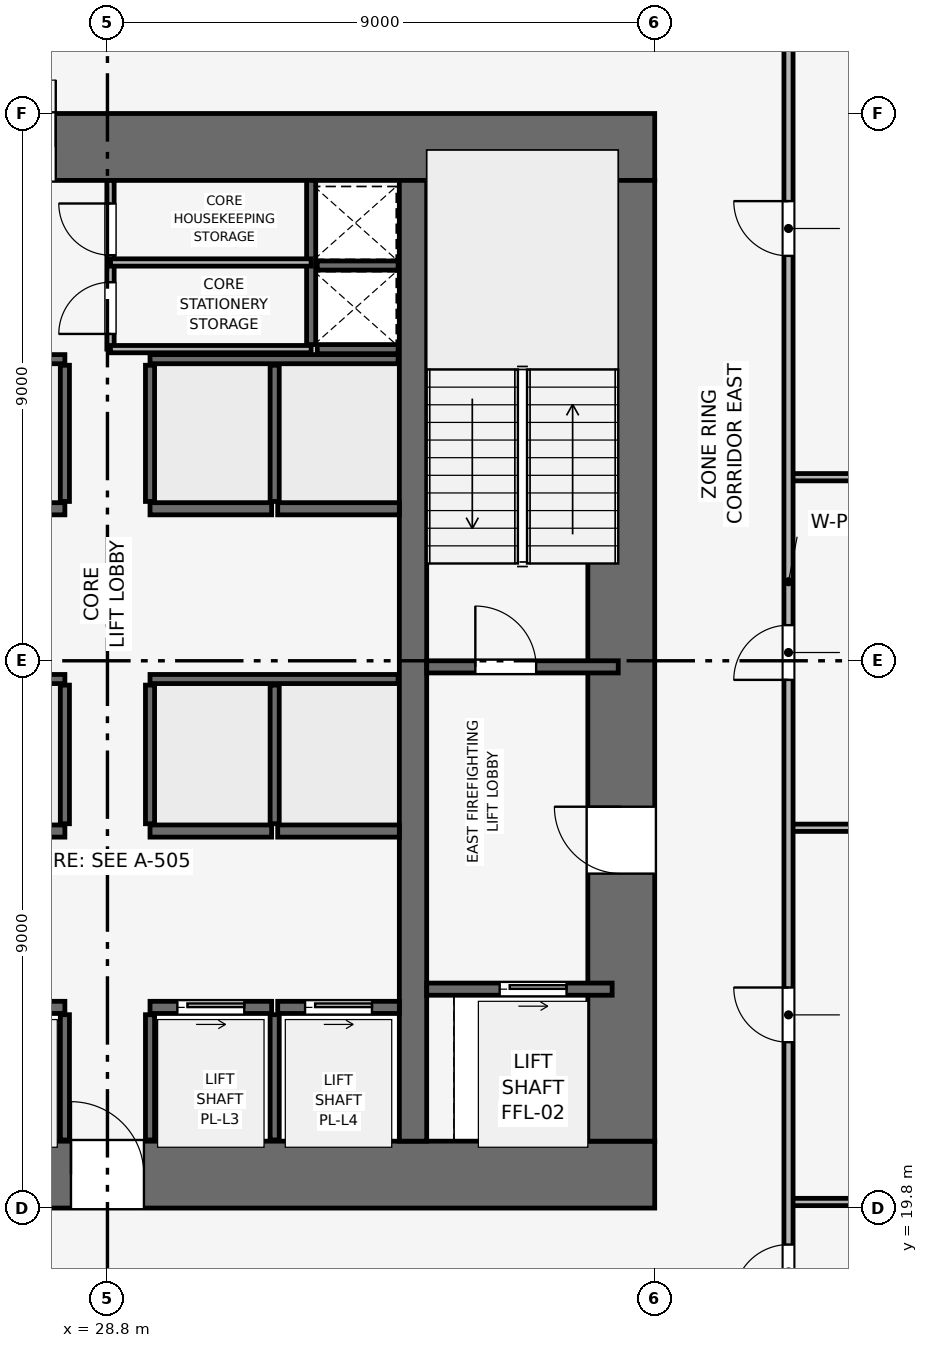
"""IFC4 building model, lengths in metres.
Left out: names, types, materials, properties, quantities, classifications, styles, units other than length and angle.
Written with IfcOpenShell. Run it as: python <this file> out.ifc"""

import sys

from ifc_helpers import new_model, si_unit, direction, frame, frame_2d, origin, place, context, subcontext, project, spatial, rectangle, extrude, element, fill, save


model = new_model("IFC4")
c1 = context("Model", 3, precision=1e-05, world=origin(), true_north=direction((0.0, 1.0)))
c2 = subcontext(c1, "Body", "Model", "MODEL_VIEW")
j1 = project(units=[si_unit("LENGTHUNIT", "METRE"), si_unit("PLANEANGLEUNIT", "RADIAN")], contexts=[c1])
p1 = place(None, origin())
s1 = spatial("IfcSite", under=j1, at=p1, CompositionType="ELEMENT")
p2 = place(p1, origin())
s2 = spatial("IfcBuilding", under=s1, at=p2, CompositionType="ELEMENT")
p3 = place(p2, frame((0.0, 0.0, 104.1)))
s3 = spatial("IfcBuildingStorey", under=s2, at=p3, CompositionType="ELEMENT", Elevation=104.1)
p4 = place(p3, frame((19.8, 20.35, 0.0), z_axis=(0.0, 0.0, 1.0), x_axis=(1.0, 0.0, 0.0)))
e1 = element("IfcWall", 1, at=p4, inside=s3, PredefinedType="SHEAR", context=c2, shape_type="SweptSolid", body=[
    extrude(rectangle(XDim=18.0, YDim=1.1, at=frame_2d((9.0, 0.0))), origin(), (0.0, 0.0, 1.0), 3.9),
])
p5 = place(p4, frame((8.4, 0.0, 0.0)))
e2 = element("IfcOpeningElement", 2, at=p5, cuts=e1, PredefinedType="OPENING", context=c2, shape_type="SweptSolid", body=[
    extrude(rectangle(XDim=1.2, YDim=2.2, at=frame_2d((0.6, 1.1))), frame((0.0, 0.56, 0.0), z_axis=(0.0, -1.0, 0.0), x_axis=(1.0, 0.0, 0.0)), (0.0, 0.0, 1.0), 1.12),
])
p6 = place(p3, frame((19.8, 37.25, 0.0), z_axis=(0.0, 0.0, 1.0), x_axis=(1.0, 0.0, 0.0)))
e3 = element("IfcWall", 3, at=p6, inside=s3, PredefinedType="SHEAR", context=c2, shape_type="SweptSolid", body=[
    extrude(rectangle(XDim=18.0, YDim=1.1, at=frame_2d((9.0, 0.0))), origin(), (0.0, 0.0, 1.0), 3.9),
])
p7 = place(p6, frame((7.05, 0.0, 0.0)))
e4 = element("IfcOpeningElement", 4, at=p7, cuts=e3, PredefinedType="OPENING", context=c2, shape_type="SweptSolid", body=[
    extrude(rectangle(XDim=1.1, YDim=2.15, at=frame_2d((0.55, 1.075))), frame((0.0, 0.56, 0.0), z_axis=(0.0, -1.0, 0.0), x_axis=(1.0, 0.0, 0.0)), (0.0, 0.0, 1.0), 1.12),
])
p8 = place(p3, frame((37.25, 20.9, 0.0), z_axis=(0.0, 0.0, 1.0), x_axis=(0.0, 1.0, 0.0)))
e5 = element("IfcWall", 5, at=p8, inside=s3, PredefinedType="SHEAR", context=c2, shape_type="SweptSolid", body=[
    extrude(rectangle(XDim=15.8, YDim=1.1, at=frame_2d((7.9, 0.0))), origin(), (0.0, 0.0, 1.0), 3.9),
])
p9 = place(p8, frame((4.4, 0.0, 0.0)))
e6 = element("IfcOpeningElement", 6, at=p9, cuts=e5, PredefinedType="OPENING", context=c2, shape_type="SweptSolid", body=[
    extrude(rectangle(XDim=1.1, YDim=2.15, at=frame_2d((0.55, 1.075))), frame((0.0, 0.56, 0.0), z_axis=(0.0, -1.0, 0.0), x_axis=(1.0, 0.0, 0.0)), (0.0, 0.0, 1.0), 1.12),
])
p10 = place(p3, frame((33.825, 20.9, 0.0), z_axis=(0.0, 0.0, 1.0), x_axis=(0.0, 1.0, 0.0)))
e7 = element("IfcWall", 7, at=p10, inside=s3, PredefinedType="SHEAR", context=c2, shape_type="SweptSolid", body=[
    extrude(rectangle(XDim=15.8, YDim=0.45, at=frame_2d((7.9, 0.0))), origin(), (0.0, 0.0, 1.0), 3.9),
])
p11 = place(p3, frame((34.05, 28.7, 0.0), z_axis=(0.0, 0.0, 1.0), x_axis=(1.0, 0.0, 0.0)))
e8 = element("IfcWall", 8, at=p11, inside=s3, PredefinedType="SHEAR", context=c2, shape_type="SweptSolid", body=[
    extrude(rectangle(XDim=3.15, YDim=0.2, at=frame_2d((1.575, 0.0))), origin(), (0.0, 0.0, 1.0), 3.54),
])
p12 = place(p11, frame((0.8, 0.0, 0.0)))
e9 = element("IfcOpeningElement", 9, at=p12, cuts=e8, PredefinedType="OPENING", context=c2, shape_type="SweptSolid", body=[
    extrude(rectangle(XDim=1.0, YDim=2.1, at=frame_2d((0.5, 1.05))), frame((0.0, 0.11, 0.0), z_axis=(0.0, -1.0, 0.0), x_axis=(1.0, 0.0, 0.0)), (0.0, 0.0, 1.0), 0.22),
])
p13 = place(p3, frame((32.15, 34.0, 0.0), z_axis=(0.0, 0.0, 1.0), x_axis=(0.0, 1.0, 0.0)))
e10 = element("IfcWall", 10, at=p13, inside=s3, PredefinedType="SHEAR", context=c2, shape_type="SweptSolid", body=[
    extrude(rectangle(XDim=2.7, YDim=0.15, at=frame_2d((1.35, 0.0))), origin(), (0.0, 0.0, 1.0), 3.54),
])
for number, where, z_axis, x_axis in (
    (11, (32.25, 33.925, 0.0), (0.0, 0.0, 1.0), (1.0, 0.0, 0.0)),
    (12, (32.25, 35.3, 0.0), (0.0, 0.0, 1.0), (1.0, 0.0, 0.0)),
):
    element("IfcWall", number, at=place(p3, frame(where, z_axis=z_axis, x_axis=x_axis)), inside=s3, PredefinedType="SHEAR", context=c2, shape_type="SweptSolid", body=[
        extrude(rectangle(XDim=1.33, YDim=0.15, at=frame_2d((0.665, 0.0))), origin(), (0.0, 0.0, 1.0), 3.54),
    ])
p14 = place(p3, frame((34.05, 23.4, 0.0), z_axis=(0.0, 0.0, 1.0), x_axis=(1.0, 0.0, 0.0)))
e13 = element("IfcWall", 13, at=p14, inside=s3, PredefinedType="SHEAR", context=c2, shape_type="SweptSolid", body=[
    extrude(rectangle(XDim=3.05, YDim=0.2, at=frame_2d((1.525, 0.0))), origin(), (0.0, 0.0, 1.0), 3.54),
])
p15 = place(p14, frame((1.2, 0.0, 0.0)))
e14 = element("IfcOpeningElement", 14, at=p15, cuts=e13, PredefinedType="OPENING", context=c2, shape_type="SweptSolid", body=[
    extrude(rectangle(XDim=1.1, YDim=2.15, at=frame_2d((0.55, 1.075))), frame((0.0, 0.11, 0.0), z_axis=(0.0, -1.0, 0.0), x_axis=(1.0, 0.0, 0.0)), (0.0, 0.0, 1.0), 0.22),
])
p16 = place(p3, frame((26.1, 23.1, 0.0), z_axis=(0.0, 0.0, 1.0), x_axis=(1.0, 0.0, 0.0)))
e15 = element("IfcWall", 15, at=p16, inside=s3, PredefinedType="SHEAR", context=c2, shape_type="SweptSolid", body=[
    extrude(rectangle(XDim=2.0, YDim=0.2, at=frame_2d((1.0, 0.0))), origin(), (0.0, 0.0, 1.0), 3.54),
])
p17 = place(p16, frame((0.45, 0.0, 0.0)))
e16 = element("IfcOpeningElement", 16, at=p17, cuts=e15, PredefinedType="OPENING", context=c2, shape_type="SweptSolid", body=[
    extrude(rectangle(XDim=1.1, YDim=2.15, at=frame_2d((0.55, 1.075))), frame((0.0, 0.11, 0.0), z_axis=(0.0, -1.0, 0.0), x_axis=(1.0, 0.0, 0.0)), (0.0, 0.0, 1.0), 0.22),
])
p18 = place(p3, frame((29.5, 23.1, 0.0), z_axis=(0.0, 0.0, 1.0), x_axis=(1.0, 0.0, 0.0)))
e17 = element("IfcWall", 17, at=p18, inside=s3, PredefinedType="SHEAR", context=c2, shape_type="SweptSolid", body=[
    extrude(rectangle(XDim=2.0, YDim=0.2, at=frame_2d((1.0, 0.0))), origin(), (0.0, 0.0, 1.0), 3.54),
])
p19 = place(p18, frame((0.45, 0.0, 0.0)))
e18 = element("IfcOpeningElement", 18, at=p19, cuts=e17, PredefinedType="OPENING", context=c2, shape_type="SweptSolid", body=[
    extrude(rectangle(XDim=1.1, YDim=2.15, at=frame_2d((0.55, 1.075))), frame((0.0, 0.11, 0.0), z_axis=(0.0, -1.0, 0.0), x_axis=(1.0, 0.0, 0.0)), (0.0, 0.0, 1.0), 0.22),
])
p20 = place(p3, frame((31.6, 23.1, 0.0), z_axis=(0.0, 0.0, 1.0), x_axis=(1.0, 0.0, 0.0)))
e19 = element("IfcWall", 19, at=p20, inside=s3, PredefinedType="SHEAR", context=c2, shape_type="SweptSolid", body=[
    extrude(rectangle(XDim=2.0, YDim=0.2, at=frame_2d((1.0, 0.0))), origin(), (0.0, 0.0, 1.0), 3.54),
])
p21 = place(p20, frame((0.45, 0.0, 0.0)))
e20 = element("IfcOpeningElement", 20, at=p21, cuts=e19, PredefinedType="OPENING", context=c2, shape_type="SweptSolid", body=[
    extrude(rectangle(XDim=1.1, YDim=2.15, at=frame_2d((0.55, 1.075))), frame((0.0, 0.11, 0.0), z_axis=(0.0, -1.0, 0.0), x_axis=(1.0, 0.0, 0.0)), (0.0, 0.0, 1.0), 0.22),
])
for number, where, z_axis, x_axis in (
    (21, (26.1, 26.0, 0.0), (0.0, 0.0, 1.0), (1.0, 0.0, 0.0)),
    (22, (29.5, 26.0, 0.0), (0.0, 0.0, 1.0), (1.0, 0.0, 0.0)),
    (23, (31.6, 26.0, 0.0), (0.0, 0.0, 1.0), (1.0, 0.0, 0.0)),
    (24, (26.1, 31.3, 0.0), (0.0, 0.0, 1.0), (1.0, 0.0, 0.0)),
    (25, (29.5, 31.3, 0.0), (0.0, 0.0, 1.0), (1.0, 0.0, 0.0)),
    (26, (31.6, 31.3, 0.0), (0.0, 0.0, 1.0), (1.0, 0.0, 0.0)),
):
    element("IfcWall", number, at=place(p3, frame(where, z_axis=z_axis, x_axis=x_axis)), inside=s3, PredefinedType="SHEAR", context=c2, shape_type="SweptSolid", body=[
        extrude(rectangle(XDim=2.0, YDim=0.2, at=frame_2d((1.0, 0.0))), origin(), (0.0, 0.0, 1.0), 3.54),
    ])
for number, where, z_axis, x_axis in (
    (27, (28.1, 20.92, 0.0), (0.0, 0.0, 1.0), (0.0, 1.0, 0.0)),
    (28, (29.5, 20.92, 0.0), (0.0, 0.0, 1.0), (0.0, 1.0, 0.0)),
    (29, (31.55, 20.92, 0.0), (0.0, 0.0, 1.0), (0.0, 1.0, 0.0)),
):
    element("IfcWall", number, at=place(p3, frame(where, z_axis=z_axis, x_axis=x_axis)), inside=s3, PredefinedType="SHEAR", context=c2, shape_type="SweptSolid", body=[
        extrude(rectangle(XDim=2.06, YDim=0.15, at=frame_2d((1.03, 0.0))), origin(), (0.0, 0.0, 1.0), 3.54),
    ])
for number, where, z_axis, x_axis in (
    (30, (24.02, 28.5, 0.0), (0.0, 0.0, 1.0), (1.0, 0.0, 0.0)),
    (31, (29.5, 28.5, 0.0), (0.0, 0.0, 1.0), (1.0, 0.0, 0.0)),
):
    element("IfcWall", number, at=place(p3, frame(where, z_axis=z_axis, x_axis=x_axis)), inside=s3, PredefinedType="SHEAR", context=c2, shape_type="SweptSolid", body=[
        extrude(rectangle(XDim=4.08, YDim=0.15, at=frame_2d((2.04, 0.0))), origin(), (0.0, 0.0, 1.0), 3.54),
    ])
for number, where, z_axis, x_axis in (
    (32, (28.1, 26.12, 0.0), (0.0, 0.0, 1.0), (0.0, 1.0, 0.0)),
    (33, (29.5, 26.12, 0.0), (0.0, 0.0, 1.0), (0.0, 1.0, 0.0)),
    (34, (31.55, 26.12, 0.0), (0.0, 0.0, 1.0), (0.0, 1.0, 0.0)),
):
    element("IfcWall", number, at=place(p3, frame(where, z_axis=z_axis, x_axis=x_axis)), inside=s3, PredefinedType="SHEAR", context=c2, shape_type="SweptSolid", body=[
        extrude(rectangle(XDim=2.28, YDim=0.15, at=frame_2d((1.14, 0.0))), origin(), (0.0, 0.0, 1.0), 3.54),
    ])
for number, where, z_axis, x_axis in (
    (35, (24.02, 33.76, 0.0), (0.0, 0.0, 1.0), (1.0, 0.0, 0.0)),
    (36, (29.5, 33.76, 0.0), (0.0, 0.0, 1.0), (1.0, 0.0, 0.0)),
):
    element("IfcWall", number, at=place(p3, frame(where, z_axis=z_axis, x_axis=x_axis)), inside=s3, PredefinedType="SHEAR", context=c2, shape_type="SweptSolid", body=[
        extrude(rectangle(XDim=4.08, YDim=0.15, at=frame_2d((2.04, 0.0))), origin(), (0.0, 0.0, 1.0), 3.54),
    ])
for number, where, z_axis, x_axis in (
    (37, (28.1, 31.42, 0.0), (0.0, 0.0, 1.0), (0.0, 1.0, 0.0)),
    (38, (29.5, 31.42, 0.0), (0.0, 0.0, 1.0), (0.0, 1.0, 0.0)),
    (39, (31.55, 31.42, 0.0), (0.0, 0.0, 1.0), (0.0, 1.0, 0.0)),
):
    element("IfcWall", number, at=place(p3, frame(where, z_axis=z_axis, x_axis=x_axis)), inside=s3, PredefinedType="SHEAR", context=c2, shape_type="SweptSolid", body=[
        extrude(rectangle(XDim=2.24, YDim=0.15, at=frame_2d((1.12, 0.0))), origin(), (0.0, 0.0, 1.0), 3.54),
    ])
p22 = place(p3, frame((28.85, 33.925, 0.0), z_axis=(0.0, 0.0, 1.0), x_axis=(0.0, 1.0, 0.0)))
e40 = element("IfcWall", 40, at=p22, inside=s3, PredefinedType="PARTITIONING", context=c2, shape_type="SweptSolid", body=[
    extrude(rectangle(XDim=2.775, YDim=0.12, at=frame_2d((1.387, 0.0))), origin(), (0.0, 0.0, 1.0), 3.54),
])
p23 = place(p22, frame((0.25, 0.0, 0.0)))
e41 = element("IfcOpeningElement", 41, at=p23, cuts=e40, PredefinedType="OPENING", context=c2, shape_type="SweptSolid", body=[
    extrude(rectangle(XDim=0.85, YDim=2.1, at=frame_2d((0.425, 1.05))), frame((0.0, 0.07, 0.0), z_axis=(0.0, -1.0, 0.0), x_axis=(1.0, 0.0, 0.0)), (0.0, 0.0, 1.0), 0.14),
])
p24 = place(p22, frame((1.545, 0.0, 0.0)))
e42 = element("IfcOpeningElement", 42, at=p24, cuts=e40, PredefinedType="OPENING", context=c2, shape_type="SweptSolid", body=[
    extrude(rectangle(XDim=0.85, YDim=2.1, at=frame_2d((0.425, 1.05))), frame((0.0, 0.07, 0.0), z_axis=(0.0, -1.0, 0.0), x_axis=(1.0, 0.0, 0.0)), (0.0, 0.0, 1.0), 0.14),
])
for number, where, z_axis, x_axis in (
    (43, (28.85, 35.35, 0.0), (0.0, 0.0, 1.0), (1.0, 0.0, 0.0)),
    (44, (28.85, 33.925, 0.0), (0.0, 0.0, 1.0), (1.0, 0.0, 0.0)),
):
    element("IfcWall", number, at=place(p3, frame(where, z_axis=z_axis, x_axis=x_axis)), inside=s3, PredefinedType="PARTITIONING", context=c2, shape_type="SweptSolid", body=[
        extrude(rectangle(XDim=3.3, YDim=0.12, at=frame_2d((1.65, 0.0))), origin(), (0.0, 0.0, 1.0), 3.54),
    ])
for number, where, z_axis, x_axis in (
    (45, (40.0, 19.9, 0.0), (0.0, 0.0, 1.0), (1.0, 0.0, 0.0)),
    (46, (40.0, 26.054, 0.0), (0.0, 0.0, 1.0), (1.0, 0.0, 0.0)),
    (47, (40.0, 31.819, 0.0), (0.0, 0.0, 1.0), (1.0, 0.0, 0.0)),
):
    element("IfcWall", number, at=place(p3, frame(where, z_axis=z_axis, x_axis=x_axis)), inside=s3, PredefinedType="PARTITIONING", context=c2, shape_type="SweptSolid", body=[
        extrude(rectangle(XDim=16.57, YDim=0.12, at=frame_2d((8.285, 0.0))), origin(), (0.0, 0.0, 1.0), 2.825),
    ])
p25 = place(p3, frame((40.0, 17.6, 0.0), z_axis=(0.0, 0.0, 1.0), x_axis=(0.0, 1.0, 0.0)))
e48 = element("IfcWall", 48, at=p25, inside=s3, PredefinedType="PARTITIONING", context=c2, shape_type="SweptSolid", body=[
    extrude(rectangle(XDim=22.4, YDim=0.15, at=frame_2d((11.2, 0.0))), origin(), (0.0, 0.0, 1.0), 2.975),
])
p26 = place(p25, frame((0.7, 0.0, 0.0)))
e49 = element("IfcOpeningElement", 49, at=p26, cuts=e48, PredefinedType="OPENING", context=c2, shape_type="SweptSolid", body=[
    extrude(rectangle(XDim=0.9, YDim=2.1, at=frame_2d((0.45, 1.05))), frame((0.0, 0.085, 0.0), z_axis=(0.0, -1.0, 0.0), x_axis=(1.0, 0.0, 0.0)), (0.0, 0.0, 1.0), 0.17),
])
p27 = place(p25, frame((4.927, 0.0, 0.0)))
e50 = element("IfcOpeningElement", 50, at=p27, cuts=e48, PredefinedType="OPENING", context=c2, shape_type="SweptSolid", body=[
    extrude(rectangle(XDim=0.9, YDim=2.1, at=frame_2d((0.45, 1.05))), frame((0.0, 0.085, 0.0), z_axis=(0.0, -1.0, 0.0), x_axis=(1.0, 0.0, 0.0)), (0.0, 0.0, 1.0), 0.17),
])
p28 = place(p25, frame((10.886, 0.0, 0.0)))
e51 = element("IfcOpeningElement", 51, at=p28, cuts=e48, PredefinedType="OPENING", context=c2, shape_type="SweptSolid", body=[
    extrude(rectangle(XDim=0.9, YDim=2.1, at=frame_2d((0.45, 1.05))), frame((0.0, 0.085, 0.0), z_axis=(0.0, -1.0, 0.0), x_axis=(1.0, 0.0, 0.0)), (0.0, 0.0, 1.0), 0.17),
])
p29 = place(p25, frame((17.859, 0.0, 0.0)))
e52 = element("IfcOpeningElement", 52, at=p29, cuts=e48, PredefinedType="OPENING", context=c2, shape_type="SweptSolid", body=[
    extrude(rectangle(XDim=0.9, YDim=2.1, at=frame_2d((0.45, 1.05))), frame((0.0, 0.085, 0.0), z_axis=(0.0, -1.0, 0.0), x_axis=(1.0, 0.0, 0.0)), (0.0, 0.0, 1.0), 0.17),
])
p30 = place(p12, origin())
e53 = element("IfcDoor", 53, at=p30, inside=s3, OperationType="SINGLE_SWING_LEFT", PredefinedType="DOOR", context=c2, shape_type="SweptSolid", body=[
    extrude(rectangle(XDim=1.0, YDim=2.1, at=frame_2d((0.5, 1.05))), frame((0.0, 0.025, 0.0), z_axis=(0.0, -1.0, 0.0), x_axis=(1.0, 0.0, 0.0)), (0.0, 0.0, 1.0), 0.05),
])
fill(e9, e53)
p31 = place(p15, origin())
e54 = element("IfcDoor", 54, at=p31, inside=s3, OperationType="SLIDING_TO_RIGHT", PredefinedType="DOOR", context=c2, shape_type="SweptSolid", body=[
    extrude(rectangle(XDim=1.1, YDim=2.15, at=frame_2d((0.55, 1.075))), frame((0.0, 0.025, 0.0), z_axis=(0.0, -1.0, 0.0), x_axis=(1.0, 0.0, 0.0)), (0.0, 0.0, 1.0), 0.05),
])
fill(e14, e54)
p32 = place(p19, origin())
e55 = element("IfcDoor", 55, at=p32, inside=s3, OperationType="SLIDING_TO_RIGHT", PredefinedType="DOOR", context=c2, shape_type="SweptSolid", body=[
    extrude(rectangle(XDim=1.1, YDim=2.15, at=frame_2d((0.55, 1.075))), frame((0.0, 0.025, 0.0), z_axis=(0.0, -1.0, 0.0), x_axis=(1.0, 0.0, 0.0)), (0.0, 0.0, 1.0), 0.05),
])
fill(e18, e55)
p33 = place(p21, origin())
e56 = element("IfcDoor", 56, at=p33, inside=s3, OperationType="SLIDING_TO_RIGHT", PredefinedType="DOOR", context=c2, shape_type="SweptSolid", body=[
    extrude(rectangle(XDim=1.1, YDim=2.15, at=frame_2d((0.55, 1.075))), frame((0.0, 0.025, 0.0), z_axis=(0.0, -1.0, 0.0), x_axis=(1.0, 0.0, 0.0)), (0.0, 0.0, 1.0), 0.05),
])
fill(e20, e56)
p34 = place(p23, origin())
e57 = element("IfcDoor", 57, at=p34, inside=s3, OperationType="SINGLE_SWING_LEFT", PredefinedType="DOOR", context=c2, shape_type="SweptSolid", body=[
    extrude(rectangle(XDim=0.85, YDim=2.1, at=frame_2d((0.425, 1.05))), frame((0.0, 0.025, 0.0), z_axis=(0.0, -1.0, 0.0), x_axis=(1.0, 0.0, 0.0)), (0.0, 0.0, 1.0), 0.05),
])
fill(e41, e57)
p35 = place(p24, origin())
e58 = element("IfcDoor", 58, at=p35, inside=s3, OperationType="SINGLE_SWING_RIGHT", PredefinedType="DOOR", context=c2, shape_type="SweptSolid", body=[
    extrude(rectangle(XDim=0.85, YDim=2.1, at=frame_2d((0.425, 1.05))), frame((0.0, 0.025, 0.0), z_axis=(0.0, -1.0, 0.0), x_axis=(1.0, 0.0, 0.0)), (0.0, 0.0, 1.0), 0.05),
])
fill(e42, e58)
p36 = place(p26, origin())
e59 = element("IfcDoor", 59, at=p36, inside=s3, OperationType="SINGLE_SWING_LEFT", PredefinedType="DOOR", context=c2, shape_type="SweptSolid", body=[
    extrude(rectangle(XDim=0.9, YDim=2.1, at=frame_2d((0.45, 1.05))), frame((0.0, 0.025, 0.0), z_axis=(0.0, -1.0, 0.0), x_axis=(1.0, 0.0, 0.0)), (0.0, 0.0, 1.0), 0.05),
])
fill(e49, e59)
p37 = place(p27, origin())
e60 = element("IfcDoor", 60, at=p37, inside=s3, OperationType="SINGLE_SWING_RIGHT", PredefinedType="DOOR", context=c2, shape_type="SweptSolid", body=[
    extrude(rectangle(XDim=0.9, YDim=2.1, at=frame_2d((0.45, 1.05))), frame((0.0, 0.025, 0.0), z_axis=(0.0, -1.0, 0.0), x_axis=(1.0, 0.0, 0.0)), (0.0, 0.0, 1.0), 0.05),
])
fill(e50, e60)
p38 = place(p28, origin())
e61 = element("IfcDoor", 61, at=p38, inside=s3, OperationType="SINGLE_SWING_LEFT", PredefinedType="DOOR", context=c2, shape_type="SweptSolid", body=[
    extrude(rectangle(XDim=0.9, YDim=2.1, at=frame_2d((0.45, 1.05))), frame((0.0, 0.025, 0.0), z_axis=(0.0, -1.0, 0.0), x_axis=(1.0, 0.0, 0.0)), (0.0, 0.0, 1.0), 0.05),
])
fill(e51, e61)
p39 = place(p29, origin())
e62 = element("IfcDoor", 62, at=p39, inside=s3, OperationType="SINGLE_SWING_RIGHT", PredefinedType="DOOR", context=c2, shape_type="SweptSolid", body=[
    extrude(rectangle(XDim=0.9, YDim=2.1, at=frame_2d((0.45, 1.05))), frame((0.0, 0.025, 0.0), z_axis=(0.0, -1.0, 0.0), x_axis=(1.0, 0.0, 0.0)), (0.0, 0.0, 1.0), 0.05),
])
fill(e52, e62)
p40 = place(p9, origin())
e63 = element("IfcDoor", 63, at=p40, inside=s3, OperationType="SINGLE_SWING_RIGHT", PredefinedType="DOOR", context=c2, shape_type="SweptSolid", body=[
    extrude(rectangle(XDim=1.1, YDim=2.15, at=frame_2d((0.55, 1.075))), frame((0.0, 0.025, 0.0), z_axis=(0.0, -1.0, 0.0), x_axis=(1.0, 0.0, 0.0)), (0.0, 0.0, 1.0), 0.05),
])
fill(e6, e63)
p41 = place(p5, origin())
e64 = element("IfcDoor", 64, at=p41, inside=s3, OperationType="SINGLE_SWING_LEFT", PredefinedType="DOOR", context=c2, shape_type="SweptSolid", body=[
    extrude(rectangle(XDim=1.2, YDim=2.2, at=frame_2d((0.6, 1.1))), frame((0.0, 0.025, 0.0), z_axis=(0.0, -1.0, 0.0), x_axis=(1.0, 0.0, 0.0)), (0.0, 0.0, 1.0), 0.05),
])
fill(e2, e64)
p42 = place(p7, origin())
e65 = element("IfcDoor", 65, at=p42, inside=s3, OperationType="SINGLE_SWING_RIGHT", PredefinedType="DOOR", context=c2, shape_type="SweptSolid", body=[
    extrude(rectangle(XDim=1.1, YDim=2.15, at=frame_2d((0.55, 1.075))), frame((0.0, 0.025, 0.0), z_axis=(0.0, -1.0, 0.0), x_axis=(1.0, 0.0, 0.0)), (0.0, 0.0, 1.0), 0.05),
])
fill(e4, e65)
save(model, sys.argv[1])
